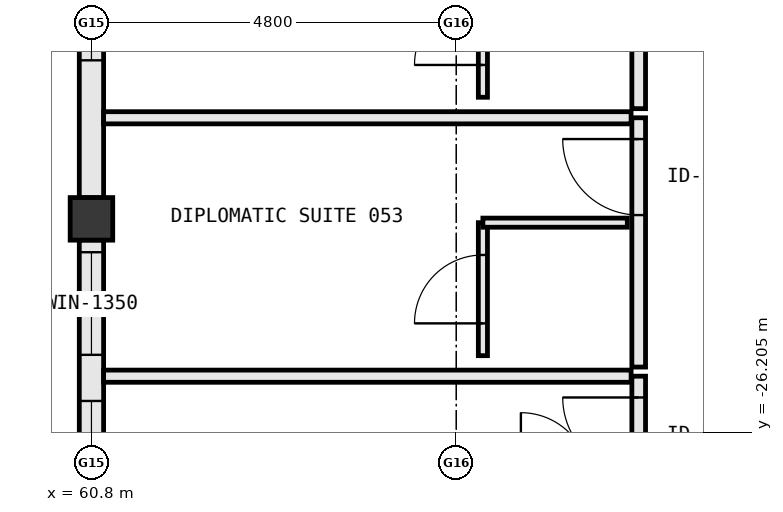
"""IFC4 building model, lengths in metres.
Left out: names, types, materials, properties, quantities, classifications, styles, units other than length and angle.
Written with IfcOpenShell. Run it as: python <this file> out.ifc"""

import sys

from ifc_helpers import new_model, si_unit, direction, frame, frame_2d, origin, origin_2d, place, context, subcontext, project, spatial, rectangle, extrude, element, fill, save


model = new_model("IFC4")
c1 = context("Model", 3, precision=1e-05, world=origin(), true_north=direction((0.0, 1.0)))
c2 = subcontext(c1, "Body", "Model", "MODEL_VIEW")
j1 = project(units=[si_unit("LENGTHUNIT", "METRE"), si_unit("PLANEANGLEUNIT", "RADIAN")], contexts=[c1])
p1 = place(None, origin())
s1 = spatial("IfcSite", under=j1, at=p1, CompositionType="ELEMENT")
p2 = place(p1, origin())
s2 = spatial("IfcBuilding", under=s1, at=p2, CompositionType="ELEMENT")
p3 = place(p2, frame((0.0, 0.0, 16.2)))
s3 = spatial("IfcBuildingStorey", under=s2, at=p3, CompositionType="ELEMENT", Elevation=16.2)
p4 = place(p3, frame((60.8, -23.4, 0.0), z_axis=(0.0, 0.0, 1.0), x_axis=(1.0, 0.0, 0.0)))
e1 = element("IfcColumn", 1, at=p4, inside=s3, PredefinedType="COLUMN", context=c2, shape_type="SweptSolid", body=[
    extrude(rectangle(XDim=0.56, YDim=0.56, at=origin_2d()), origin(), (0.0, 0.0, 1.0), 3.8),
])
p5 = place(p3, frame((60.8, -18.878, 0.0), z_axis=(0.0, 0.0, 1.0), x_axis=(0.0, -1.0, 0.0)))
e2 = element("IfcWall", 2, at=p5, inside=s3, PredefinedType="STANDARD", context=c2, shape_type="SweptSolid", body=[
    extrude(rectangle(XDim=4.244, YDim=0.32, at=frame_2d((2.122, 0.0))), origin(), (0.0, 0.0, 1.0), 3.015),
])
p6 = place(p5, frame((0.636, 0.0, 0.85)))
e3 = element("IfcOpeningElement", 3, at=p6, cuts=e2, PredefinedType="OPENING", context=c2, shape_type="SweptSolid", body=[
    extrude(rectangle(XDim=1.8, YDim=1.85, at=frame_2d((0.9, 0.925))), frame((0.0, 0.172, 0.0), z_axis=(0.0, -1.0, 0.0), x_axis=(1.0, 0.0, 0.0)), (0.0, 0.0, 1.0), 0.344),
])
p7 = place(p3, frame((60.8, -23.678, 0.0), z_axis=(0.0, 0.0, 1.0), x_axis=(0.0, -1.0, 0.0)))
e4 = element("IfcWall", 4, at=p7, inside=s3, PredefinedType="STANDARD", context=c2, shape_type="SweptSolid", body=[
    extrude(rectangle(XDim=4.244, YDim=0.32, at=frame_2d((2.122, 0.0))), origin(), (0.0, 0.0, 1.0), 3.015),
])
p8 = place(p7, frame((2.118, 0.0, 0.85)))
e5 = element("IfcOpeningElement", 5, at=p8, cuts=e4, PredefinedType="OPENING", context=c2, shape_type="SweptSolid", body=[
    extrude(rectangle(XDim=1.8, YDim=1.85, at=frame_2d((0.9, 0.925))), frame((0.0, 0.172, 0.0), z_axis=(0.0, -1.0, 0.0), x_axis=(1.0, 0.0, 0.0)), (0.0, 0.0, 1.0), 0.344),
])
p9 = place(p7, frame((0.161, 0.0, 0.85)))
e6 = element("IfcOpeningElement", 6, at=p9, cuts=e4, PredefinedType="OPENING", context=c2, shape_type="SweptSolid", body=[
    extrude(rectangle(XDim=1.35, YDim=1.65, at=frame_2d((0.675, 0.825))), frame((0.0, 0.172, 0.0), z_axis=(0.0, -1.0, 0.0), x_axis=(1.0, 0.0, 0.0)), (0.0, 0.0, 1.0), 0.344),
])
p10 = place(p3, frame((68.0, -28.75, 0.0), z_axis=(0.0, 0.0, 1.0), x_axis=(0.0, 1.0, 0.0)))
e7 = element("IfcWall", 7, at=p10, inside=s3, PredefinedType="PARTITIONING", context=c2, shape_type="SweptSolid", body=[
    extrude(rectangle(XDim=3.28, YDim=0.18, at=frame_2d((1.64, 0.0))), origin(), (0.0, 0.0, 1.0), 3.56),
])
p11 = place(p10, frame((2.0, 0.0, 0.0)))
e8 = element("IfcOpeningElement", 8, at=p11, cuts=e7, PredefinedType="OPENING", context=c2, shape_type="SweptSolid", body=[
    extrude(rectangle(XDim=1.0, YDim=2.2, at=frame_2d((0.5, 1.1))), frame((0.0, 0.102, 0.0), z_axis=(0.0, -1.0, 0.0), x_axis=(1.0, 0.0, 0.0)), (0.0, 0.0, 1.0), 0.204),
])
p12 = place(p3, frame((60.96, -25.47, 0.0), z_axis=(0.0, 0.0, 1.0), x_axis=(1.0, 0.0, 0.0)))
e9 = element("IfcWall", 9, at=p12, inside=s3, PredefinedType="PARTITIONING", context=c2, shape_type="SweptSolid", body=[
    extrude(rectangle(XDim=6.94, YDim=0.16, at=frame_2d((3.47, 0.0))), origin(), (0.0, 0.0, 1.0), 3.56),
])
p13 = place(p3, frame((68.0, -25.35, 0.0), z_axis=(0.0, 0.0, 1.0), x_axis=(0.0, 1.0, 0.0)))
e10 = element("IfcWall", 10, at=p13, inside=s3, PredefinedType="PARTITIONING", context=c2, shape_type="SweptSolid", body=[
    extrude(rectangle(XDim=3.28, YDim=0.18, at=frame_2d((1.64, 0.0))), origin(), (0.0, 0.0, 1.0), 3.56),
])
p14 = place(p13, frame((2.0, 0.0, 0.0)))
e11 = element("IfcOpeningElement", 11, at=p14, cuts=e10, PredefinedType="OPENING", context=c2, shape_type="SweptSolid", body=[
    extrude(rectangle(XDim=1.0, YDim=2.2, at=frame_2d((0.5, 1.1))), frame((0.0, 0.102, 0.0), z_axis=(0.0, -1.0, 0.0), x_axis=(1.0, 0.0, 0.0)), (0.0, 0.0, 1.0), 0.204),
])
p15 = place(p3, frame((60.96, -22.07, 0.0), z_axis=(0.0, 0.0, 1.0), x_axis=(1.0, 0.0, 0.0)))
e12 = element("IfcWall", 12, at=p15, inside=s3, PredefinedType="PARTITIONING", context=c2, shape_type="SweptSolid", body=[
    extrude(rectangle(XDim=6.94, YDim=0.16, at=frame_2d((3.47, 0.0))), origin(), (0.0, 0.0, 1.0), 3.56),
])
p16 = place(p3, frame((65.95, -25.2, 0.0), z_axis=(0.0, 0.0, 1.0), x_axis=(0.0, 1.0, 0.0)))
e13 = element("IfcWall", 13, at=p16, inside=s3, PredefinedType="PARTITIONING", context=c2, shape_type="SweptSolid", body=[
    extrude(rectangle(XDim=1.75, YDim=0.12, at=frame_2d((0.875, 0.0))), origin(), (0.0, 0.0, 1.0), 2.915),
])
p17 = place(p16, frame((0.425, 0.0, 0.0)))
e14 = element("IfcOpeningElement", 14, at=p17, cuts=e13, PredefinedType="OPENING", context=c2, shape_type="SweptSolid", body=[
    extrude(rectangle(XDim=0.9, YDim=2.15, at=frame_2d((0.45, 1.075))), frame((0.0, 0.072, 0.0), z_axis=(0.0, -1.0, 0.0), x_axis=(1.0, 0.0, 0.0)), (0.0, 0.0, 1.0), 0.144),
])
p18 = place(p3, frame((65.95, -23.45, 0.0), z_axis=(0.0, 0.0, 1.0), x_axis=(1.0, 0.0, 0.0)))
e15 = element("IfcWall", 15, at=p18, inside=s3, PredefinedType="PARTITIONING", context=c2, shape_type="SweptSolid", body=[
    extrude(rectangle(XDim=1.9, YDim=0.12, at=frame_2d((0.95, 0.0))), origin(), (0.0, 0.0, 1.0), 2.695),
])
p19 = place(p3, frame((68.0, -21.95, 0.0), z_axis=(0.0, 0.0, 1.0), x_axis=(0.0, 1.0, 0.0)))
e16 = element("IfcWall", 16, at=p19, inside=s3, PredefinedType="PARTITIONING", context=c2, shape_type="SweptSolid", body=[
    extrude(rectangle(XDim=3.28, YDim=0.18, at=frame_2d((1.64, 0.0))), origin(), (0.0, 0.0, 1.0), 3.56),
])
p20 = place(p19, frame((2.0, 0.0, 0.0)))
e17 = element("IfcOpeningElement", 17, at=p20, cuts=e16, PredefinedType="OPENING", context=c2, shape_type="SweptSolid", body=[
    extrude(rectangle(XDim=1.0, YDim=2.2, at=frame_2d((0.5, 1.1))), frame((0.0, 0.102, 0.0), z_axis=(0.0, -1.0, 0.0), x_axis=(1.0, 0.0, 0.0)), (0.0, 0.0, 1.0), 0.204),
])
p21 = place(p3, frame((65.95, -21.8, 0.0), z_axis=(0.0, 0.0, 1.0), x_axis=(0.0, 1.0, 0.0)))
e18 = element("IfcWall", 18, at=p21, inside=s3, PredefinedType="PARTITIONING", context=c2, shape_type="SweptSolid", body=[
    extrude(rectangle(XDim=1.75, YDim=0.12, at=frame_2d((0.875, 0.0))), origin(), (0.0, 0.0, 1.0), 2.915),
])
p22 = place(p21, frame((0.425, 0.0, 0.0)))
e19 = element("IfcOpeningElement", 19, at=p22, cuts=e18, PredefinedType="OPENING", context=c2, shape_type="SweptSolid", body=[
    extrude(rectangle(XDim=0.9, YDim=2.15, at=frame_2d((0.45, 1.075))), frame((0.0, 0.072, 0.0), z_axis=(0.0, -1.0, 0.0), x_axis=(1.0, 0.0, 0.0)), (0.0, 0.0, 1.0), 0.144),
])
p23 = place(p8, origin())
e20 = element("IfcWindow", 20, at=p23, inside=s3, PartitioningType="SINGLE_PANEL", PredefinedType="WINDOW", context=c2, shape_type="SweptSolid", body=[
    extrude(rectangle(XDim=1.8, YDim=1.85, at=frame_2d((0.9, 0.925))), frame((0.0, 0.03, 0.0), z_axis=(0.0, -1.0, 0.0), x_axis=(1.0, 0.0, 0.0)), (0.0, 0.0, 1.0), 0.06),
])
fill(e5, e20)
p24 = place(p9, origin())
e21 = element("IfcWindow", 21, at=p24, inside=s3, PartitioningType="SINGLE_PANEL", PredefinedType="WINDOW", context=c2, shape_type="SweptSolid", body=[
    extrude(rectangle(XDim=1.35, YDim=1.65, at=frame_2d((0.675, 0.825))), frame((0.0, 0.03, 0.0), z_axis=(0.0, -1.0, 0.0), x_axis=(1.0, 0.0, 0.0)), (0.0, 0.0, 1.0), 0.06),
])
fill(e6, e21)
p25 = place(p6, origin())
e22 = element("IfcWindow", 22, at=p25, inside=s3, PartitioningType="SINGLE_PANEL", PredefinedType="WINDOW", context=c2, shape_type="SweptSolid", body=[
    extrude(rectangle(XDim=1.8, YDim=1.85, at=frame_2d((0.9, 0.925))), frame((0.0, 0.03, 0.0), z_axis=(0.0, -1.0, 0.0), x_axis=(1.0, 0.0, 0.0)), (0.0, 0.0, 1.0), 0.06),
])
fill(e3, e22)
p26 = place(p11, origin())
e23 = element("IfcDoor", 23, at=p26, inside=s3, OperationType="SINGLE_SWING_RIGHT", PredefinedType="DOOR", context=c2, shape_type="SweptSolid", body=[
    extrude(rectangle(XDim=1.0, YDim=2.2, at=frame_2d((0.5, 1.1))), frame((0.0, 0.025, 0.0), z_axis=(0.0, -1.0, 0.0), x_axis=(1.0, 0.0, 0.0)), (0.0, 0.0, 1.0), 0.05),
])
fill(e8, e23)
p27 = place(p14, origin())
e24 = element("IfcDoor", 24, at=p27, inside=s3, OperationType="SINGLE_SWING_RIGHT", PredefinedType="DOOR", context=c2, shape_type="SweptSolid", body=[
    extrude(rectangle(XDim=1.0, YDim=2.2, at=frame_2d((0.5, 1.1))), frame((0.0, 0.025, 0.0), z_axis=(0.0, -1.0, 0.0), x_axis=(1.0, 0.0, 0.0)), (0.0, 0.0, 1.0), 0.05),
])
fill(e11, e24)
p28 = place(p17, origin())
e25 = element("IfcDoor", 25, at=p28, inside=s3, OperationType="SINGLE_SWING_LEFT", PredefinedType="DOOR", context=c2, shape_type="SweptSolid", body=[
    extrude(rectangle(XDim=0.9, YDim=2.15, at=frame_2d((0.45, 1.075))), frame((0.0, 0.025, 0.0), z_axis=(0.0, -1.0, 0.0), x_axis=(1.0, 0.0, 0.0)), (0.0, 0.0, 1.0), 0.05),
])
fill(e14, e25)
p29 = place(p22, origin())
e26 = element("IfcDoor", 26, at=p29, inside=s3, OperationType="SINGLE_SWING_LEFT", PredefinedType="DOOR", context=c2, shape_type="SweptSolid", body=[
    extrude(rectangle(XDim=0.9, YDim=2.15, at=frame_2d((0.45, 1.075))), frame((0.0, 0.025, 0.0), z_axis=(0.0, -1.0, 0.0), x_axis=(1.0, 0.0, 0.0)), (0.0, 0.0, 1.0), 0.05),
])
fill(e19, e26)
save(model, sys.argv[1])
